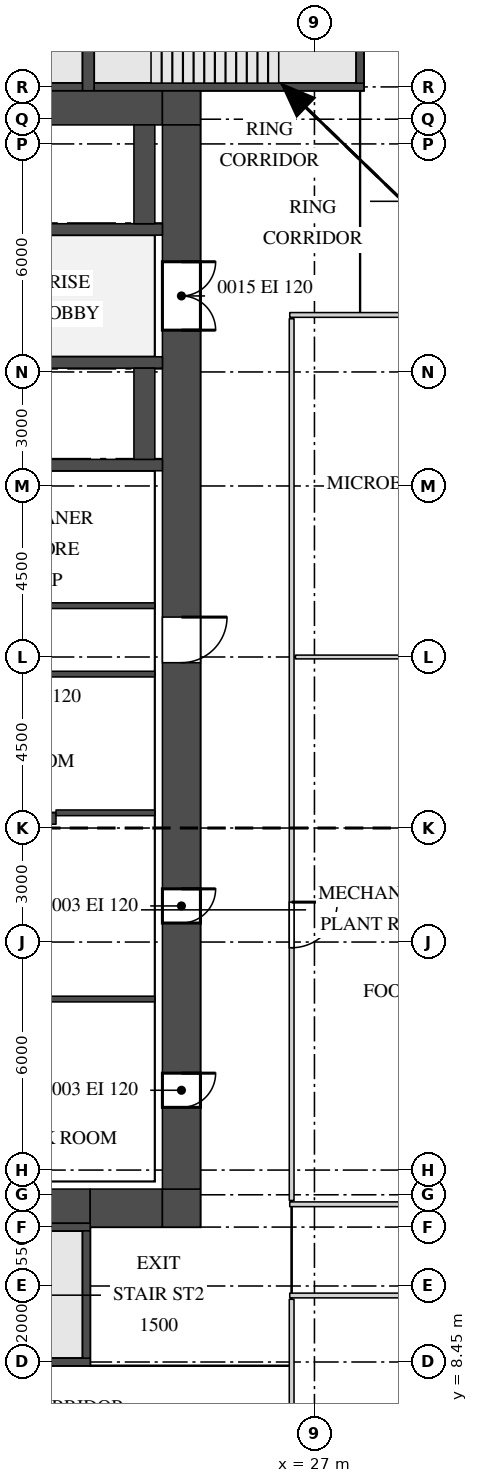
"""IFC4 building model, lengths in metres.
Left out: names, types, materials, properties, quantities, classifications, styles, units other than length and angle.
Written with IfcOpenShell. Run it as: python <this file> out.ifc"""

import sys

from ifc_helpers import new_model, si_unit, direction, frame, frame_2d, origin, place, context, subcontext, project, spatial, rectangle, extrude, source, transform, mapped, element, fill, save


model = new_model("IFC4")
c1 = context("Model", 3, precision=1e-05, world=origin(), true_north=direction((0.0, 1.0)))
c2 = subcontext(c1, "Body", "Model", "MODEL_VIEW")
j1 = project(units=[si_unit("LENGTHUNIT", "METRE"), si_unit("PLANEANGLEUNIT", "RADIAN")], contexts=[c1])
p1 = place(None, origin())
s1 = spatial("IfcSite", under=j1, at=p1, CompositionType="ELEMENT")
p2 = place(p1, origin())
s2 = spatial("IfcBuilding", under=s1, at=p2, CompositionType="ELEMENT")
p3 = place(p2, frame((0.0, 0.0, 114.7)))
s3 = spatial("IfcBuildingStorey", under=s2, at=p3, CompositionType="ELEMENT", Elevation=114.7)
m1 = source(origin(), c2, "Body", "SweptSolid", [
    extrude(rectangle(XDim=9.1, YDim=0.9, at=frame_2d((4.55, 0.0))), origin(), (0.0, 0.0, 1.0), 4.1),
])
p4 = place(p3, frame((13.9, 41.45, 0.0), z_axis=(0.0, 0.0, 1.0), x_axis=(1.0, 0.0, 0.0)))
e1 = element("IfcWall", 1, at=p4, inside=s3, PredefinedType="SHEAR", context=c2, shape_type="MappedRepresentation", body=[
    mapped(m1, transform((0.0, 0.0, 0.0))),
])
m2 = source(origin(), c2, "Body", "SweptSolid", [
    extrude(rectangle(XDim=1.0, YDim=0.9, at=frame_2d((0.5, 0.0))), origin(), (0.0, 0.0, 1.0), 4.1),
])
p5 = place(p3, frame((23.0, 41.45, 0.0), z_axis=(0.0, 0.0, 1.0), x_axis=(1.0, 0.0, 0.0)))
e2 = element("IfcWall", 2, at=p5, inside=s3, PredefinedType="SHEAR", context=c2, shape_type="MappedRepresentation", body=[
    mapped(m2, transform((0.0, 0.0, 0.0))),
])
m3 = source(origin(), c2, "Body", "SweptSolid", [
    extrude(rectangle(XDim=7.2, YDim=0.9, at=frame_2d((3.6, 0.0))), origin(), (0.0, 0.0, 1.0), 4.1),
])
p6 = place(p3, frame((13.9, 12.55, 0.0), z_axis=(0.0, 0.0, 1.0), x_axis=(1.0, 0.0, 0.0)))
e3 = element("IfcWall", 3, at=p6, inside=s3, PredefinedType="SHEAR", context=c2, shape_type="MappedRepresentation", body=[
    mapped(m3, transform((0.0, 0.0, 0.0))),
])
m4 = source(origin(), c2, "Body", "SweptSolid", [
    extrude(rectangle(XDim=1.0, YDim=2.1, at=frame_2d((0.5, 1.05))), frame((0.0, 0.46, 0.0), z_axis=(0.0, -1.0, 0.0), x_axis=(1.0, 0.0, 0.0)), (0.0, 0.0, 1.0), 0.92),
])
p7 = place(p6, frame((0.8, 0.0, 0.0)))
e4 = element("IfcOpeningElement", 4, at=p7, cuts=e3, PredefinedType="OPENING", context=c2, shape_type="MappedRepresentation", body=[
    mapped(m4, transform((0.0, 0.0, 0.0))),
])
m5 = source(origin(), c2, "Body", "SweptSolid", [
    extrude(rectangle(XDim=1.9, YDim=1.0, at=frame_2d((0.95, 0.0))), origin(), (0.0, 0.0, 1.0), 4.1),
])
p8 = place(p3, frame((21.1, 12.5, 0.0), z_axis=(0.0, 0.0, 1.0), x_axis=(1.0, 0.0, 0.0)))
e5 = element("IfcWall", 5, at=p8, inside=s3, PredefinedType="SHEAR", context=c2, shape_type="MappedRepresentation", body=[
    mapped(m5, transform((0.0, 0.0, 0.0))),
])
m6 = source(origin(), c2, "Body", "SweptSolid", [
    extrude(rectangle(XDim=1.0, YDim=1.0, at=frame_2d((0.5, 0.0))), origin(), (0.0, 0.0, 1.0), 4.1),
])
p9 = place(p3, frame((23.0, 12.5, 0.0), z_axis=(0.0, 0.0, 1.0), x_axis=(1.0, 0.0, 0.0)))
e6 = element("IfcWall", 6, at=p9, inside=s3, PredefinedType="SHEAR", context=c2, shape_type="MappedRepresentation", body=[
    mapped(m6, transform((0.0, 0.0, 0.0))),
])
m7 = source(origin(), c2, "Body", "SweptSolid", [
    extrude(rectangle(XDim=28.0, YDim=1.0, at=frame_2d((14.0, 0.0))), origin(), (0.0, 0.0, 1.0), 4.1),
])
p10 = place(p3, frame((23.5, 13.0, 0.0), z_axis=(0.0, 0.0, 1.0), x_axis=(0.0, 1.0, 0.0)))
e7 = element("IfcWall", 7, at=p10, inside=s3, PredefinedType="SHEAR", context=c2, shape_type="MappedRepresentation", body=[
    mapped(m7, transform((0.0, 0.0, 0.0))),
])
m8 = source(origin(), c2, "Body", "SweptSolid", [
    extrude(rectangle(XDim=1.8, YDim=2.1, at=frame_2d((0.9, 1.05))), frame((0.0, 0.51, 0.0), z_axis=(0.0, -1.0, 0.0), x_axis=(1.0, 0.0, 0.0)), (0.0, 0.0, 1.0), 1.02),
])
p11 = place(p10, frame((22.6, 0.0, 0.0)))
e8 = element("IfcOpeningElement", 8, at=p11, cuts=e7, PredefinedType="OPENING", context=c2, shape_type="MappedRepresentation", body=[
    mapped(m8, transform((0.0, 0.0, 0.0))),
])
m9 = source(origin(), c2, "Body", "SweptSolid", [
    extrude(rectangle(XDim=1.2, YDim=2.1, at=frame_2d((0.6, 1.05))), frame((0.0, 0.51, 0.0), z_axis=(0.0, -1.0, 0.0), x_axis=(1.0, 0.0, 0.0)), (0.0, 0.0, 1.0), 1.02),
])
p12 = place(p10, frame((13.85, 0.0, 0.0)))
e9 = element("IfcOpeningElement", 9, at=p12, cuts=e7, PredefinedType="OPENING", context=c2, shape_type="MappedRepresentation", body=[
    mapped(m9, transform((0.0, 0.0, 0.0))),
])
m10 = source(origin(), c2, "Body", "SweptSolid", [
    extrude(rectangle(XDim=0.9, YDim=2.1, at=frame_2d((0.45, 1.05))), frame((0.0, 0.51, 0.0), z_axis=(0.0, -1.0, 0.0), x_axis=(1.0, 0.0, 0.0)), (0.0, 0.0, 1.0), 1.02),
])
p13 = place(p10, frame((2.15, 0.0, 0.0)))
e10 = element("IfcOpeningElement", 10, at=p13, cuts=e7, PredefinedType="OPENING", context=c2, shape_type="MappedRepresentation", body=[
    mapped(m10, transform((0.0, 0.0, 0.0))),
])
p14 = place(p10, frame((7.0, 0.0, 0.0)))
e11 = element("IfcOpeningElement", 11, at=p14, cuts=e7, PredefinedType="OPENING", context=c2, shape_type="MappedRepresentation", body=[
    mapped(m10, transform((0.0, 0.0, 0.0))),
])
m11 = source(origin(), c2, "Body", "SweptSolid", [
    extrude(rectangle(XDim=7.0, YDim=0.2, at=frame_2d((3.5, 0.0))), origin(), (0.0, 0.0, 1.0), 4.1),
])
p15 = place(p3, frame((13.9, 42.0, 0.0), z_axis=(0.0, 0.0, 1.0), x_axis=(1.0, 0.0, 0.0)))
e12 = element("IfcWall", 12, at=p15, inside=s3, PredefinedType="SHEAR", context=c2, shape_type="MappedRepresentation", body=[
    mapped(m11, transform((0.0, 0.0, 0.0))),
])
m12 = source(origin(), c2, "Body", "SweptSolid", [
    extrude(rectangle(XDim=5.3, YDim=0.2, at=frame_2d((2.65, 0.0))), origin(), (0.0, 0.0, 1.0), 4.1),
])
p16 = place(p3, frame((15.8, 12.0, 0.0), z_axis=(0.0, 0.0, 1.0), x_axis=(1.0, 0.0, 0.0)))
e13 = element("IfcWall", 13, at=p16, inside=s3, PredefinedType="SHEAR", context=c2, shape_type="MappedRepresentation", body=[
    mapped(m12, transform((0.0, 0.0, 0.0))),
])
m13 = source(origin(), c2, "Body", "SweptSolid", [
    extrude(rectangle(XDim=7.2, YDim=0.2, at=frame_2d((3.6, 0.0))), origin(), (0.0, 0.0, 1.0), 4.1),
])
p17 = place(p3, frame((13.9, 8.45, 0.0), z_axis=(0.0, 0.0, 1.0), x_axis=(1.0, 0.0, 0.0)))
e14 = element("IfcWall", 14, at=p17, inside=s3, PredefinedType="SHEAR", context=c2, shape_type="MappedRepresentation", body=[
    mapped(m13, transform((0.0, 0.0, 0.0))),
])
m14 = source(origin(), c2, "Body", "SweptSolid", [
    extrude(rectangle(XDim=1.2, YDim=2.1, at=frame_2d((0.6, 1.05))), frame((0.0, 0.11, 0.0), z_axis=(0.0, -1.0, 0.0), x_axis=(1.0, 0.0, 0.0)), (0.0, 0.0, 1.0), 0.22),
])
p18 = place(p17, frame((0.35, 0.0, 0.0)))
e15 = element("IfcOpeningElement", 15, at=p18, cuts=e14, PredefinedType="OPENING", context=c2, shape_type="MappedRepresentation", body=[
    mapped(m14, transform((0.0, 0.0, 0.0))),
])
m15 = source(origin(), c2, "Body", "SweptSolid", [
    extrude(rectangle(XDim=7.1, YDim=0.2, at=frame_2d((3.55, 0.0))), origin(), (0.0, 0.0, 1.0), 4.1),
])
p19 = place(p3, frame((21.2, 42.0, 0.0), z_axis=(0.0, 0.0, 1.0), x_axis=(1.0, 0.0, 0.0)))
e16 = element("IfcWall", 16, at=p19, inside=s3, PredefinedType="SHEAR", context=c2, shape_type="MappedRepresentation", body=[
    mapped(m15, transform((0.0, 0.0, 0.0))),
])
m16 = source(origin(), c2, "Body", "SweptSolid", [
    extrude(rectangle(XDim=3.75, YDim=0.3, at=frame_2d((1.875, 0.0))), origin(), (0.0, 0.0, 1.0), 4.1),
])
p20 = place(p3, frame((21.05, 41.9, 0.0), z_axis=(0.0, 0.0, 1.0), x_axis=(0.0, 1.0, 0.0)))
e17 = element("IfcWall", 17, at=p20, inside=s3, PredefinedType="SHEAR", context=c2, shape_type="MappedRepresentation", body=[
    mapped(m16, transform((0.0, 0.0, 0.0))),
])
m17 = source(origin(), c2, "Body", "SweptSolid", [
    extrude(rectangle(XDim=3.35, YDim=0.2, at=frame_2d((1.675, 0.0))), origin(), (0.0, 0.0, 1.0), 4.1),
])
for number, where, z_axis, x_axis in (
    (18, (21.0, 8.55, 0.0), (0.0, 0.0, 1.0), (0.0, 1.0, 0.0)),
    (19, (28.2, 42.1, 0.0), (0.0, 0.0, 1.0), (0.0, 1.0, 0.0)),
):
    element("IfcWall", number, at=place(p3, frame(where, z_axis=z_axis, x_axis=x_axis)), inside=s3, PredefinedType="SHEAR", context=c2, shape_type="MappedRepresentation", body=[
        mapped(m17, transform((0.0, 0.0, 0.0))),
    ])
m18 = source(origin(), c2, "Body", "SweptSolid", [
    extrude(rectangle(XDim=13.2, YDim=0.3, at=frame_2d((6.6, 0.0))), origin(), (0.0, 0.0, 1.0), 4.1),
])
p21 = place(p3, frame((7.0, 22.75, 0.0), z_axis=(0.0, 0.0, 1.0), x_axis=(1.0, 0.0, 0.0)))
e20 = element("IfcWall", 20, at=p21, inside=s3, PredefinedType="STANDARD", context=c2, shape_type="MappedRepresentation", body=[
    mapped(m18, transform((0.0, 0.0, 0.0))),
])
m19 = source(origin(), c2, "Body", "SweptSolid", [
    extrude(rectangle(XDim=16.0, YDim=0.3, at=frame_2d((8.0, 0.0))), origin(), (0.0, 0.0, 1.0), 4.1),
])
p22 = place(p3, frame((7.0, 32.05, 0.0), z_axis=(0.0, 0.0, 1.0), x_axis=(1.0, 0.0, 0.0)))
e21 = element("IfcWall", 21, at=p22, inside=s3, PredefinedType="STANDARD", context=c2, shape_type="MappedRepresentation", body=[
    mapped(m19, transform((0.0, 0.0, 0.0))),
])
p23 = place(p3, frame((7.0, 38.25, 0.0), z_axis=(0.0, 0.0, 1.0), x_axis=(1.0, 0.0, 0.0)))
e22 = element("IfcWall", 22, at=p23, inside=s3, PredefinedType="STANDARD", context=c2, shape_type="MappedRepresentation", body=[
    mapped(m19, transform((0.0, 0.0, 0.0))),
])
m20 = source(origin(), c2, "Body", "SweptSolid", [
    extrude(rectangle(XDim=1.2, YDim=2.1, at=frame_2d((0.6, 1.05))), frame((0.0, 0.16, 0.0), z_axis=(0.0, -1.0, 0.0), x_axis=(1.0, 0.0, 0.0)), (0.0, 0.0, 1.0), 0.32),
])
p24 = place(p23, frame((0.75, 0.0, 0.0)))
e23 = element("IfcOpeningElement", 23, at=p24, cuts=e22, PredefinedType="OPENING", context=c2, shape_type="MappedRepresentation", body=[
    mapped(m20, transform((0.0, 0.0, 0.0))),
])
p25 = place(p23, frame((3.3, 0.0, 0.0)))
e24 = element("IfcOpeningElement", 24, at=p25, cuts=e22, PredefinedType="OPENING", context=c2, shape_type="MappedRepresentation", body=[
    mapped(m20, transform((0.0, 0.0, 0.0))),
])
p26 = place(p23, frame((5.85, 0.0, 0.0)))
e25 = element("IfcOpeningElement", 25, at=p26, cuts=e22, PredefinedType="OPENING", context=c2, shape_type="MappedRepresentation", body=[
    mapped(m20, transform((0.0, 0.0, 0.0))),
])
p27 = place(p23, frame((8.4, 0.0, 0.0)))
e26 = element("IfcOpeningElement", 26, at=p27, cuts=e22, PredefinedType="OPENING", context=c2, shape_type="MappedRepresentation", body=[
    mapped(m20, transform((0.0, 0.0, 0.0))),
])
p28 = place(p3, frame((7.0, 34.75, 0.0), z_axis=(0.0, 0.0, 1.0), x_axis=(1.0, 0.0, 0.0)))
e27 = element("IfcWall", 27, at=p28, inside=s3, PredefinedType="STANDARD", context=c2, shape_type="MappedRepresentation", body=[
    mapped(m19, transform((0.0, 0.0, 0.0))),
])
p29 = place(p28, frame((0.75, 0.0, 0.0)))
e28 = element("IfcOpeningElement", 28, at=p29, cuts=e27, PredefinedType="OPENING", context=c2, shape_type="MappedRepresentation", body=[
    mapped(m20, transform((0.0, 0.0, 0.0))),
])
p30 = place(p28, frame((3.3, 0.0, 0.0)))
e29 = element("IfcOpeningElement", 29, at=p30, cuts=e27, PredefinedType="OPENING", context=c2, shape_type="MappedRepresentation", body=[
    mapped(m20, transform((0.0, 0.0, 0.0))),
])
p31 = place(p28, frame((5.85, 0.0, 0.0)))
e30 = element("IfcOpeningElement", 30, at=p31, cuts=e27, PredefinedType="OPENING", context=c2, shape_type="MappedRepresentation", body=[
    mapped(m20, transform((0.0, 0.0, 0.0))),
])
p32 = place(p28, frame((8.4, 0.0, 0.0)))
e31 = element("IfcOpeningElement", 31, at=p32, cuts=e27, PredefinedType="OPENING", context=c2, shape_type="MappedRepresentation", body=[
    mapped(m20, transform((0.0, 0.0, 0.0))),
])
m21 = source(origin(), c2, "Body", "SweptSolid", [
    extrude(rectangle(XDim=2.6, YDim=0.55, at=frame_2d((1.3, 0.0))), origin(), (0.0, 0.0, 1.0), 4.1),
])
p33 = place(p3, frame((22.525, 38.4, 0.0), z_axis=(0.0, 0.0, 1.0), x_axis=(0.0, 1.0, 0.0)))
e32 = element("IfcWall", 32, at=p33, inside=s3, PredefinedType="STANDARD", context=c2, shape_type="MappedRepresentation", body=[
    mapped(m21, transform((0.0, 0.0, 0.0))),
])
m22 = source(origin(), c2, "Body", "SweptSolid", [
    extrude(rectangle(XDim=2.4, YDim=0.55, at=frame_2d((1.2, 0.0))), origin(), (0.0, 0.0, 1.0), 4.1),
])
p34 = place(p3, frame((22.525, 32.2, 0.0), z_axis=(0.0, 0.0, 1.0), x_axis=(0.0, 1.0, 0.0)))
e33 = element("IfcWall", 33, at=p34, inside=s3, PredefinedType="STANDARD", context=c2, shape_type="MappedRepresentation", body=[
    mapped(m22, transform((0.0, 0.0, 0.0))),
])
m23 = source(origin(), c2, "Body", "SweptSolid", [
    extrude(rectangle(XDim=3.95, YDim=0.125, at=frame_2d((1.975, 0.0))), origin(), (0.0, 0.0, 1.0), 4.2),
])
p35 = place(p3, frame((26.4, 6.15, 0.0), z_axis=(0.0, 0.0, 1.0), x_axis=(0.0, 1.0, 0.0)))
e34 = element("IfcWall", 34, at=p35, inside=s3, PredefinedType="PARTITIONING", context=c2, shape_type="MappedRepresentation", body=[
    mapped(m23, transform((0.0, 0.0, 0.0))),
])
m24 = source(origin(), c2, "Body", "SweptSolid", [
    extrude(rectangle(XDim=20.0, YDim=0.125, at=frame_2d((10.0, 0.0))), origin(), (0.0, 0.0, 1.0), 4.2),
])
p36 = place(p3, frame((26.35, 10.2, 0.0), z_axis=(0.0, 0.0, 1.0), x_axis=(1.0, 0.0, 0.0)))
e35 = element("IfcWall", 35, at=p36, inside=s3, PredefinedType="PARTITIONING", context=c2, shape_type="MappedRepresentation", body=[
    mapped(m24, transform((0.0, 0.0, 0.0))),
])
m25 = source(origin(), c2, "Body", "SweptSolid", [
    extrude(rectangle(XDim=1.2, YDim=2.1, at=frame_2d((0.6, 1.05))), frame((0.0, 0.073, 0.0), z_axis=(0.0, -1.0, 0.0), x_axis=(1.0, 0.0, 0.0)), (0.0, 0.0, 1.0), 0.145),
])
p37 = place(p36, frame((7.25, 0.0, 0.0)))
e36 = element("IfcOpeningElement", 36, at=p37, cuts=e35, PredefinedType="OPENING", context=c2, shape_type="MappedRepresentation", body=[
    mapped(m25, transform((0.0, 0.0, 0.0))),
])
p38 = place(p36, frame((18.4, 0.0, 0.0)))
e37 = element("IfcOpeningElement", 37, at=p38, cuts=e35, PredefinedType="OPENING", context=c2, shape_type="MappedRepresentation", body=[
    mapped(m25, transform((0.0, 0.0, 0.0))),
])
m26 = source(origin(), c2, "Body", "SweptSolid", [
    extrude(rectangle(XDim=17.7, YDim=0.125, at=frame_2d((8.85, 0.0))), origin(), (0.0, 0.0, 1.0), 4.2),
])
p39 = place(p3, frame((26.35, 12.6, 0.0), z_axis=(0.0, 0.0, 1.0), x_axis=(1.0, 0.0, 0.0)))
e38 = element("IfcWall", 38, at=p39, inside=s3, PredefinedType="PARTITIONING", context=c2, shape_type="MappedRepresentation", body=[
    mapped(m26, transform((0.0, 0.0, 0.0))),
])
m27 = source(origin(), c2, "Body", "SweptSolid", [
    extrude(rectangle(XDim=23.2, YDim=0.125, at=frame_2d((11.6, 0.0))), origin(), (0.0, 0.0, 1.0), 4.2),
])
p40 = place(p3, frame((26.4, 12.7, 0.0), z_axis=(0.0, 0.0, 1.0), x_axis=(0.0, 1.0, 0.0)))
e39 = element("IfcWall", 39, at=p40, inside=s3, PredefinedType="PARTITIONING", context=c2, shape_type="MappedRepresentation", body=[
    mapped(m27, transform((0.0, 0.0, 0.0))),
])
p41 = place(p40, frame((6.65, 0.0, 0.0)))
e40 = element("IfcOpeningElement", 40, at=p41, cuts=e39, PredefinedType="OPENING", context=c2, shape_type="MappedRepresentation", body=[
    mapped(m25, transform((0.0, 0.0, 0.0))),
])
m28 = source(origin(), c2, "Body", "SweptSolid", [
    extrude(rectangle(XDim=6.6, YDim=0.15, at=frame_2d((3.3, 0.0))), origin(), (0.0, 0.0, 1.0), 4.2),
])
p42 = place(p3, frame((16.2, 18.0, 0.0), z_axis=(0.0, 0.0, 1.0), x_axis=(1.0, 0.0, 0.0)))
e41 = element("IfcWall", 41, at=p42, inside=s3, PredefinedType="PARTITIONING", context=c2, shape_type="MappedRepresentation", body=[
    mapped(m28, transform((0.0, 0.0, 0.0))),
])
m29 = source(origin(), c2, "Body", "SweptSolid", [
    extrude(rectangle(XDim=2.6, YDim=0.15, at=frame_2d((1.3, 0.0))), origin(), (0.0, 0.0, 1.0), 4.2),
])
p43 = place(p3, frame((20.2, 22.9, 0.0), z_axis=(0.0, 0.0, 1.0), x_axis=(1.0, 0.0, 0.0)))
e42 = element("IfcWall", 42, at=p43, inside=s3, PredefinedType="PARTITIONING", context=c2, shape_type="MappedRepresentation", body=[
    mapped(m29, transform((0.0, 0.0, 0.0))),
])
m30 = source(origin(), c2, "Body", "SweptSolid", [
    extrude(rectangle(XDim=6.45, YDim=0.15, at=frame_2d((3.225, 0.0))), origin(), (0.0, 0.0, 1.0), 4.2),
])
p44 = place(p3, frame((16.35, 26.55, 0.0), z_axis=(0.0, 0.0, 1.0), x_axis=(1.0, 0.0, 0.0)))
e43 = element("IfcWall", 43, at=p44, inside=s3, PredefinedType="PARTITIONING", context=c2, shape_type="MappedRepresentation", body=[
    mapped(m30, transform((0.0, 0.0, 0.0))),
])
m31 = source(origin(), c2, "Body", "SweptSolid", [
    extrude(rectangle(XDim=0.9, YDim=2.1, at=frame_2d((0.45, 1.05))), frame((0.0, 0.085, 0.0), z_axis=(0.0, -1.0, 0.0), x_axis=(1.0, 0.0, 0.0)), (0.0, 0.0, 1.0), 0.17),
])
p45 = place(p44, frame((2.8, 0.0, 0.0)))
e44 = element("IfcOpeningElement", 44, at=p45, cuts=e43, PredefinedType="OPENING", context=c2, shape_type="MappedRepresentation", body=[
    mapped(m31, transform((0.0, 0.0, 0.0))),
])
m32 = source(origin(), c2, "Body", "SweptSolid", [
    extrude(rectangle(XDim=17.4, YDim=0.1, at=frame_2d((8.7, 0.0))), origin(), (0.0, 0.0, 1.0), 4.2),
])
p46 = place(p3, frame((26.5, 27.0, 0.0), z_axis=(0.0, 0.0, 1.0), x_axis=(1.0, 0.0, 0.0)))
e45 = element("IfcWall", 45, at=p46, inside=s3, PredefinedType="PARTITIONING", context=c2, shape_type="MappedRepresentation", body=[
    mapped(m32, transform((0.0, 0.0, 0.0))),
])
m33 = source(origin(), c2, "Body", "SweptSolid", [
    extrude(rectangle(XDim=15.6, YDim=0.15, at=frame_2d((7.8, 0.0))), origin(), (0.0, 0.0, 1.0), 4.2),
])
p47 = place(p3, frame((7.2, 28.35, 0.0), z_axis=(0.0, 0.0, 1.0), x_axis=(1.0, 0.0, 0.0)))
e46 = element("IfcWall", 46, at=p47, inside=s3, PredefinedType="PARTITIONING", context=c2, shape_type="MappedRepresentation", body=[
    mapped(m33, transform((0.0, 0.0, 0.0))),
])
p48 = place(p47, frame((1.25, 0.0, 0.0)))
e47 = element("IfcOpeningElement", 47, at=p48, cuts=e46, PredefinedType="OPENING", context=c2, shape_type="MappedRepresentation", body=[
    mapped(m31, transform((0.0, 0.0, 0.0))),
])
p49 = place(p47, frame((4.65, 0.0, 0.0)))
e48 = element("IfcOpeningElement", 48, at=p49, cuts=e46, PredefinedType="OPENING", context=c2, shape_type="MappedRepresentation", body=[
    mapped(m31, transform((0.0, 0.0, 0.0))),
])
p50 = place(p47, frame((10.75, 0.0, 0.0)))
e49 = element("IfcOpeningElement", 49, at=p50, cuts=e46, PredefinedType="OPENING", context=c2, shape_type="MappedRepresentation", body=[
    mapped(m31, transform((0.0, 0.0, 0.0))),
])
m34 = source(origin(), c2, "Body", "SweptSolid", [
    extrude(rectangle(XDim=4.2, YDim=0.125, at=frame_2d((2.1, 0.0))), origin(), (0.0, 0.0, 1.0), 4.2),
])
p51 = place(p3, frame((26.35, 36.0, 0.0), z_axis=(0.0, 0.0, 1.0), x_axis=(1.0, 0.0, 0.0)))
e50 = element("IfcWall", 50, at=p51, inside=s3, PredefinedType="PARTITIONING", context=c2, shape_type="MappedRepresentation", body=[
    mapped(m34, transform((0.0, 0.0, 0.0))),
])
m35 = source(origin(), c2, "Body", "SweptSolid", [
    extrude(rectangle(XDim=1.8, YDim=2.1, at=frame_2d((0.9, 1.05))), frame((0.0, 0.45, 0.0), z_axis=(0.0, -1.0, 0.0), x_axis=(1.0, 0.0, 0.0)), (0.0, 0.0, 1.0), 0.9),
])
p52 = place(p11, origin())
e51 = element("IfcDoor", 51, at=p52, inside=s3, OperationType="DOUBLE_DOOR_SINGLE_SWING", PredefinedType="DOOR", context=c2, shape_type="MappedRepresentation", body=[
    mapped(m35, transform((0.0, 0.0, 0.0))),
])
fill(e8, e51)
m36 = source(origin(), c2, "Body", "SweptSolid", [
    extrude(rectangle(XDim=1.2, YDim=2.1, at=frame_2d((0.6, 1.05))), frame((0.0, 0.45, 0.0), z_axis=(0.0, -1.0, 0.0), x_axis=(1.0, 0.0, 0.0)), (0.0, 0.0, 1.0), 0.9),
])
p53 = place(p12, origin())
e52 = element("IfcDoor", 52, at=p53, inside=s3, OperationType="SINGLE_SWING_RIGHT", PredefinedType="DOOR", context=c2, shape_type="MappedRepresentation", body=[
    mapped(m36, transform((0.0, 0.0, 0.0))),
])
fill(e9, e52)
m37 = source(origin(), c2, "Body", "SweptSolid", [
    extrude(rectangle(XDim=0.9, YDim=2.1, at=frame_2d((0.45, 1.05))), frame((0.0, 0.45, 0.0), z_axis=(0.0, -1.0, 0.0), x_axis=(1.0, 0.0, 0.0)), (0.0, 0.0, 1.0), 0.9),
])
p54 = place(p13, origin())
e53 = element("IfcDoor", 53, at=p54, inside=s3, OperationType="SINGLE_SWING_RIGHT", PredefinedType="DOOR", context=c2, shape_type="MappedRepresentation", body=[
    mapped(m37, transform((0.0, 0.0, 0.0))),
])
fill(e10, e53)
p55 = place(p14, origin())
e54 = element("IfcDoor", 54, at=p55, inside=s3, OperationType="SINGLE_SWING_RIGHT", PredefinedType="DOOR", context=c2, shape_type="MappedRepresentation", body=[
    mapped(m37, transform((0.0, 0.0, 0.0))),
])
fill(e11, e54)
m38 = source(origin(), c2, "Body", "SweptSolid", [
    extrude(rectangle(XDim=1.2, YDim=2.1, at=frame_2d((0.6, 1.05))), frame((0.0, 0.025, 0.0), z_axis=(0.0, -1.0, 0.0), x_axis=(1.0, 0.0, 0.0)), (0.0, 0.0, 1.0), 0.05),
])
p56 = place(p41, origin())
e55 = element("IfcDoor", 55, at=p56, inside=s3, OperationType="SINGLE_SWING_RIGHT", PredefinedType="DOOR", context=c2, shape_type="MappedRepresentation", body=[
    mapped(m38, transform((0.0, 0.0, 0.0))),
])
fill(e40, e55)
save(model, sys.argv[1])
